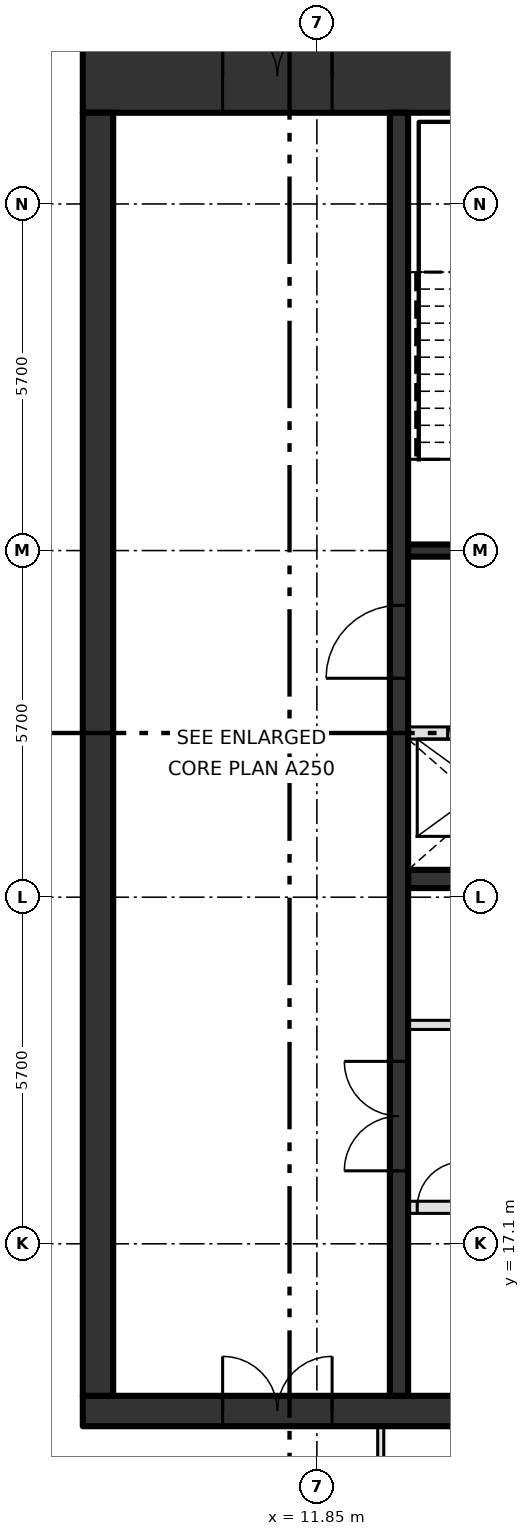
"""IFC4 building model, lengths in metres.
Left out: names, types, materials, properties, quantities, classifications, styles, units other than length and angle.
Written with IfcOpenShell. Run it as: python <this file> out.ifc"""

import sys

from ifc_helpers import new_model, si_unit, direction, frame, frame_2d, origin, place, context, subcontext, project, spatial, rectangle, extrude, element, fill, save


model = new_model("IFC4")
c1 = context("Model", 3, precision=1e-05, world=origin(), true_north=direction((0.0, 1.0)))
c2 = subcontext(c1, "Body", "Model", "MODEL_VIEW")
j1 = project(units=[si_unit("LENGTHUNIT", "METRE"), si_unit("PLANEANGLEUNIT", "RADIAN")], contexts=[c1])
p1 = place(None, origin())
s1 = spatial("IfcSite", under=j1, at=p1, CompositionType="ELEMENT")
p2 = place(p1, origin())
s2 = spatial("IfcBuilding", under=s1, at=p2, CompositionType="ELEMENT")
p3 = place(p2, frame((0.0, 0.0, 383.4)))
s3 = spatial("IfcBuildingStorey", under=s2, at=p3, CompositionType="ELEMENT", Elevation=383.4)
p4 = place(p3, frame((8.0, 14.35, -0.3), z_axis=(0.0, 0.0, 1.0), x_axis=(1.0, 0.0, 0.0)))
e1 = element("IfcWall", 1, at=p4, inside=s3, PredefinedType="SHEAR", context=c2, shape_type="SweptSolid", body=[
    extrude(rectangle(XDim=22.8, YDim=0.5, at=frame_2d((11.4, 0.0))), origin(), (0.0, 0.0, 1.0), 4.2),
])
p5 = place(p4, frame((2.3, 0.0, 0.3)))
e2 = element("IfcOpeningElement", 2, at=p5, cuts=e1, PredefinedType="OPENING", context=c2, shape_type="SweptSolid", body=[
    extrude(rectangle(XDim=1.8, YDim=2.1, at=frame_2d((0.9, 1.05))), frame((0.0, 0.26, 0.0), z_axis=(0.0, -1.0, 0.0), x_axis=(1.0, 0.0, 0.0)), (0.0, 0.0, 1.0), 0.52),
])
p6 = place(p3, frame((8.0, 36.3, -0.3), z_axis=(0.0, 0.0, 1.0), x_axis=(1.0, 0.0, 0.0)))
e3 = element("IfcWall", 3, at=p6, inside=s3, PredefinedType="SHEAR", context=c2, shape_type="SweptSolid", body=[
    extrude(rectangle(XDim=22.8, YDim=1.2, at=frame_2d((11.4, 0.0))), origin(), (0.0, 0.0, 1.0), 4.2),
])
p7 = place(p6, frame((2.3, 0.0, 0.3)))
e4 = element("IfcOpeningElement", 4, at=p7, cuts=e3, PredefinedType="OPENING", context=c2, shape_type="SweptSolid", body=[
    extrude(rectangle(XDim=1.8, YDim=2.1, at=frame_2d((0.9, 1.05))), frame((0.0, 0.61, 0.0), z_axis=(0.0, -1.0, 0.0), x_axis=(1.0, 0.0, 0.0)), (0.0, 0.0, 1.0), 1.22),
])
p8 = place(p3, frame((8.25, 14.6, -0.3), z_axis=(0.0, 0.0, 1.0), x_axis=(0.0, 1.0, 0.0)))
e5 = element("IfcWall", 5, at=p8, inside=s3, PredefinedType="SHEAR", context=c2, shape_type="SweptSolid", body=[
    extrude(rectangle(XDim=21.1, YDim=0.5, at=frame_2d((10.55, 0.0))), origin(), (0.0, 0.0, 1.0), 4.2),
])
p9 = place(p3, frame((13.35, 17.7, 0.0), z_axis=(0.0, 0.0, 1.0), x_axis=(1.0, 0.0, 0.0)))
e6 = element("IfcWall", 6, at=p9, inside=s3, PredefinedType="SOLIDWALL", context=c2, shape_type="SweptSolid", body=[
    extrude(rectangle(XDim=13.425, YDim=0.2, at=frame_2d((6.712, 0.0))), origin(), (0.0, 0.0, 1.0), 3.9),
])
p10 = place(p9, frame((2.0, 0.0, 0.0)))
e7 = element("IfcOpeningElement", 7, at=p10, cuts=e6, PredefinedType="OPENING", context=c2, shape_type="SweptSolid", body=[
    extrude(rectangle(XDim=1.1, YDim=2.1, at=frame_2d((0.55, 1.05))), frame((0.0, 0.11, 0.0), z_axis=(0.0, -1.0, 0.0), x_axis=(1.0, 0.0, 0.0)), (0.0, 0.0, 1.0), 0.22),
])
p11 = place(p9, frame((4.7, 0.0, 0.0)))
e8 = element("IfcOpeningElement", 8, at=p11, cuts=e6, PredefinedType="OPENING", context=c2, shape_type="SweptSolid", body=[
    extrude(rectangle(XDim=1.1, YDim=2.1, at=frame_2d((0.55, 1.05))), frame((0.0, 0.11, 0.0), z_axis=(0.0, -1.0, 0.0), x_axis=(1.0, 0.0, 0.0)), (0.0, 0.0, 1.0), 0.22),
])
p12 = place(p9, frame((7.4, 0.0, 0.0)))
e9 = element("IfcOpeningElement", 9, at=p12, cuts=e6, PredefinedType="OPENING", context=c2, shape_type="SweptSolid", body=[
    extrude(rectangle(XDim=1.1, YDim=2.1, at=frame_2d((0.55, 1.05))), frame((0.0, 0.11, 0.0), z_axis=(0.0, -1.0, 0.0), x_axis=(1.0, 0.0, 0.0)), (0.0, 0.0, 1.0), 0.22),
])
p13 = place(p9, frame((10.1, 0.0, 0.0)))
e10 = element("IfcOpeningElement", 10, at=p13, cuts=e6, PredefinedType="OPENING", context=c2, shape_type="SweptSolid", body=[
    extrude(rectangle(XDim=1.1, YDim=2.1, at=frame_2d((0.55, 1.05))), frame((0.0, 0.11, 0.0), z_axis=(0.0, -1.0, 0.0), x_axis=(1.0, 0.0, 0.0)), (0.0, 0.0, 1.0), 0.22),
])
p14 = place(p9, frame((0.15, 0.0, 0.0)))
e11 = element("IfcOpeningElement", 11, at=p14, cuts=e6, PredefinedType="OPENING", context=c2, shape_type="SweptSolid", body=[
    extrude(rectangle(XDim=0.75, YDim=2.1, at=frame_2d((0.375, 1.05))), frame((0.0, 0.11, 0.0), z_axis=(0.0, -1.0, 0.0), x_axis=(1.0, 0.0, 0.0)), (0.0, 0.0, 1.0), 0.22),
])
p15 = place(p9, frame((12.3, 0.0, 0.0)))
e12 = element("IfcOpeningElement", 12, at=p15, cuts=e6, PredefinedType="OPENING", context=c2, shape_type="SweptSolid", body=[
    extrude(rectangle(XDim=0.75, YDim=2.1, at=frame_2d((0.375, 1.05))), frame((0.0, 0.11, 0.0), z_axis=(0.0, -1.0, 0.0), x_axis=(1.0, 0.0, 0.0)), (0.0, 0.0, 1.0), 0.22),
])
p16 = place(p3, frame((13.35, 20.7, 0.0), z_axis=(0.0, 0.0, 1.0), x_axis=(1.0, 0.0, 0.0)))
e13 = element("IfcWall", 13, at=p16, inside=s3, PredefinedType="PARTITIONING", context=c2, shape_type="SweptSolid", body=[
    extrude(rectangle(XDim=13.425, YDim=0.15, at=frame_2d((6.712, 0.0))), origin(), (0.0, 0.0, 1.0), 3.9),
])
p17 = place(p16, frame((4.8, 0.0, 0.0)))
e14 = element("IfcOpeningElement", 14, at=p17, cuts=e13, PredefinedType="OPENING", context=c2, shape_type="SweptSolid", body=[
    extrude(rectangle(XDim=0.9, YDim=2.1, at=frame_2d((0.45, 1.05))), frame((0.0, 0.085, 0.0), z_axis=(0.0, -1.0, 0.0), x_axis=(1.0, 0.0, 0.0)), (0.0, 0.0, 1.0), 0.17),
])
p18 = place(p16, frame((11.55, 0.0, 0.0)))
e15 = element("IfcOpeningElement", 15, at=p18, cuts=e13, PredefinedType="OPENING", context=c2, shape_type="SweptSolid", body=[
    extrude(rectangle(XDim=0.9, YDim=2.1, at=frame_2d((0.45, 1.05))), frame((0.0, 0.085, 0.0), z_axis=(0.0, -1.0, 0.0), x_axis=(1.0, 0.0, 0.0)), (0.0, 0.0, 1.0), 0.17),
])
p19 = place(p3, frame((13.35, 23.1, 0.0), z_axis=(0.0, 0.0, 1.0), x_axis=(1.0, 0.0, 0.0)))
e16 = element("IfcWall", 16, at=p19, inside=s3, PredefinedType="SHEAR", context=c2, shape_type="SweptSolid", body=[
    extrude(rectangle(XDim=16.95, YDim=0.3, at=frame_2d((8.475, 0.0))), origin(), (0.0, 0.0, 1.0), 3.9),
])
p20 = place(p3, frame((13.35, 25.5, 0.0), z_axis=(0.0, 0.0, 1.0), x_axis=(1.0, 0.0, 0.0)))
e17 = element("IfcWall", 17, at=p20, inside=s3, PredefinedType="SOLIDWALL", context=c2, shape_type="SweptSolid", body=[
    extrude(rectangle(XDim=16.95, YDim=0.2, at=frame_2d((8.475, 0.0))), origin(), (0.0, 0.0, 1.0), 3.9),
])
p21 = place(p20, frame((0.65, 0.0, 0.0)))
e18 = element("IfcOpeningElement", 18, at=p21, cuts=e17, PredefinedType="OPENING", context=c2, shape_type="SweptSolid", body=[
    extrude(rectangle(XDim=1.1, YDim=2.1, at=frame_2d((0.55, 1.05))), frame((0.0, 0.11, 0.0), z_axis=(0.0, -1.0, 0.0), x_axis=(1.0, 0.0, 0.0)), (0.0, 0.0, 1.0), 0.22),
])
p22 = place(p20, frame((3.35, 0.0, 0.0)))
e19 = element("IfcOpeningElement", 19, at=p22, cuts=e17, PredefinedType="OPENING", context=c2, shape_type="SweptSolid", body=[
    extrude(rectangle(XDim=1.1, YDim=2.1, at=frame_2d((0.55, 1.05))), frame((0.0, 0.11, 0.0), z_axis=(0.0, -1.0, 0.0), x_axis=(1.0, 0.0, 0.0)), (0.0, 0.0, 1.0), 0.22),
])
p23 = place(p20, frame((6.05, 0.0, 0.0)))
e20 = element("IfcOpeningElement", 20, at=p23, cuts=e17, PredefinedType="OPENING", context=c2, shape_type="SweptSolid", body=[
    extrude(rectangle(XDim=1.1, YDim=2.1, at=frame_2d((0.55, 1.05))), frame((0.0, 0.11, 0.0), z_axis=(0.0, -1.0, 0.0), x_axis=(1.0, 0.0, 0.0)), (0.0, 0.0, 1.0), 0.22),
])
p24 = place(p20, frame((8.75, 0.0, 0.0)))
e21 = element("IfcOpeningElement", 21, at=p24, cuts=e17, PredefinedType="OPENING", context=c2, shape_type="SweptSolid", body=[
    extrude(rectangle(XDim=1.1, YDim=2.1, at=frame_2d((0.55, 1.05))), frame((0.0, 0.11, 0.0), z_axis=(0.0, -1.0, 0.0), x_axis=(1.0, 0.0, 0.0)), (0.0, 0.0, 1.0), 0.22),
])
p25 = place(p20, frame((13.0, 0.0, 0.0)))
e22 = element("IfcOpeningElement", 22, at=p25, cuts=e17, PredefinedType="OPENING", context=c2, shape_type="SweptSolid", body=[
    extrude(rectangle(XDim=0.9, YDim=2.1, at=frame_2d((0.45, 1.05))), frame((0.0, 0.11, 0.0), z_axis=(0.0, -1.0, 0.0), x_axis=(1.0, 0.0, 0.0)), (0.0, 0.0, 1.0), 0.22),
])
p26 = place(p3, frame((13.35, 28.5, 0.0), z_axis=(0.0, 0.0, 1.0), x_axis=(1.0, 0.0, 0.0)))
e23 = element("IfcWall", 23, at=p26, inside=s3, PredefinedType="SOLIDWALL", context=c2, shape_type="SweptSolid", body=[
    extrude(rectangle(XDim=6.75, YDim=0.2, at=frame_2d((3.375, 0.0))), origin(), (0.0, 0.0, 1.0), 3.9),
])
p27 = place(p26, frame((0.95, 0.0, 0.0)))
e24 = element("IfcOpeningElement", 24, at=p27, cuts=e23, PredefinedType="OPENING", context=c2, shape_type="SweptSolid", body=[
    extrude(rectangle(XDim=1.2, YDim=2.1, at=frame_2d((0.6, 1.05))), frame((0.0, 0.11, 0.0), z_axis=(0.0, -1.0, 0.0), x_axis=(1.0, 0.0, 0.0)), (0.0, 0.0, 1.0), 0.22),
])
p28 = place(p26, frame((3.75, 0.0, 0.0)))
e25 = element("IfcOpeningElement", 25, at=p28, cuts=e23, PredefinedType="OPENING", context=c2, shape_type="SweptSolid", body=[
    extrude(rectangle(XDim=1.1, YDim=2.1, at=frame_2d((0.55, 1.05))), frame((0.0, 0.11, 0.0), z_axis=(0.0, -1.0, 0.0), x_axis=(1.0, 0.0, 0.0)), (0.0, 0.0, 1.0), 0.22),
])
p29 = place(p3, frame((13.2, 14.6, 0.0), z_axis=(0.0, 0.0, 1.0), x_axis=(0.0, 1.0, 0.0)))
e26 = element("IfcWall", 26, at=p29, inside=s3, PredefinedType="SHEAR", context=c2, shape_type="SweptSolid", body=[
    extrude(rectangle(XDim=21.1, YDim=0.3, at=frame_2d((10.55, 0.0))), origin(), (0.0, 0.0, 1.0), 3.9),
])
p30 = place(p29, frame((3.7, 0.0, 0.0)))
e27 = element("IfcOpeningElement", 27, at=p30, cuts=e26, PredefinedType="OPENING", context=c2, shape_type="SweptSolid", body=[
    extrude(rectangle(XDim=1.8, YDim=2.1, at=frame_2d((0.9, 1.05))), frame((0.0, 0.16, 0.0), z_axis=(0.0, -1.0, 0.0), x_axis=(1.0, 0.0, 0.0)), (0.0, 0.0, 1.0), 0.32),
])
p31 = place(p29, frame((11.8, 0.0, 0.0)))
e28 = element("IfcOpeningElement", 28, at=p31, cuts=e26, PredefinedType="OPENING", context=c2, shape_type="SweptSolid", body=[
    extrude(rectangle(XDim=1.2, YDim=2.1, at=frame_2d((0.6, 1.05))), frame((0.0, 0.16, 0.0), z_axis=(0.0, -1.0, 0.0), x_axis=(1.0, 0.0, 0.0)), (0.0, 0.0, 1.0), 0.32),
])
p32 = place(p3, frame((12.9, 10.078, 0.0), z_axis=(0.0, 0.0, 1.0), x_axis=(0.0, 1.0, 0.0)))
e29 = element("IfcWall", 29, at=p32, inside=s3, PredefinedType="PARTITIONING", context=c2, shape_type="SweptSolid", body=[
    extrude(rectangle(XDim=4.022, YDim=0.1, at=frame_2d((2.011, 0.0))), origin(), (0.0, 0.0, 1.0), 3.9),
])
p33 = place(p3, frame((13.183, 9.578, 0.0), z_axis=(0.0, 0.0, 1.0), x_axis=(0.374400970809, 0.927266904973, 0.0)))
e30 = element("IfcWall", 30, at=p33, inside=s3, PredefinedType="PARTITIONING", context=c2, shape_type="SweptSolid", body=[
    extrude(rectangle(XDim=4.877, YDim=0.1, at=frame_2d((2.438, 0.0))), origin(), (0.0, 0.0, 1.0), 3.9),
])
p34 = place(p21, origin())
e31 = element("IfcDoor", 31, at=p34, inside=s3, OperationType="SLIDING_TO_LEFT", PredefinedType="DOOR", context=c2, shape_type="SweptSolid", body=[
    extrude(rectangle(XDim=1.1, YDim=2.1, at=frame_2d((0.55, 1.05))), frame((0.0, 0.025, 0.0), z_axis=(0.0, -1.0, 0.0), x_axis=(1.0, 0.0, 0.0)), (0.0, 0.0, 1.0), 0.05),
])
fill(e18, e31)
p35 = place(p14, origin())
e32 = element("IfcDoor", 32, at=p35, inside=s3, OperationType="SINGLE_SWING_RIGHT", PredefinedType="DOOR", context=c2, shape_type="SweptSolid", body=[
    extrude(rectangle(XDim=0.75, YDim=2.1, at=frame_2d((0.375, 1.05))), frame((0.0, 0.025, 0.0), z_axis=(0.0, -1.0, 0.0), x_axis=(1.0, 0.0, 0.0)), (0.0, 0.0, 1.0), 0.05),
])
fill(e11, e32)
p36 = place(p30, origin())
e33 = element("IfcDoor", 33, at=p36, inside=s3, OperationType="DOUBLE_DOOR_SINGLE_SWING", PredefinedType="DOOR", context=c2, shape_type="SweptSolid", body=[
    extrude(rectangle(XDim=1.8, YDim=2.1, at=frame_2d((0.9, 1.05))), frame((0.0, 0.025, 0.0), z_axis=(0.0, -1.0, 0.0), x_axis=(1.0, 0.0, 0.0)), (0.0, 0.0, 1.0), 0.05),
])
fill(e27, e33)
p37 = place(p31, origin())
e34 = element("IfcDoor", 34, at=p37, inside=s3, OperationType="SINGLE_SWING_LEFT", PredefinedType="DOOR", context=c2, shape_type="SweptSolid", body=[
    extrude(rectangle(XDim=1.2, YDim=2.1, at=frame_2d((0.6, 1.05))), frame((0.0, 0.025, 0.0), z_axis=(0.0, -1.0, 0.0), x_axis=(1.0, 0.0, 0.0)), (0.0, 0.0, 1.0), 0.05),
])
fill(e28, e34)
p38 = place(p7, origin())
e35 = element("IfcDoor", 35, at=p38, inside=s3, OperationType="DOUBLE_DOOR_SINGLE_SWING", PredefinedType="DOOR", context=c2, shape_type="SweptSolid", body=[
    extrude(rectangle(XDim=1.8, YDim=2.1, at=frame_2d((0.9, 1.05))), frame((0.0, 0.025, 0.0), z_axis=(0.0, -1.0, 0.0), x_axis=(1.0, 0.0, 0.0)), (0.0, 0.0, 1.0), 0.05),
])
fill(e4, e35)
p39 = place(p5, origin())
e36 = element("IfcDoor", 36, at=p39, inside=s3, OperationType="DOUBLE_DOOR_SINGLE_SWING", PredefinedType="DOOR", context=c2, shape_type="SweptSolid", body=[
    extrude(rectangle(XDim=1.8, YDim=2.1, at=frame_2d((0.9, 1.05))), frame((0.0, 0.025, 0.0), z_axis=(0.0, -1.0, 0.0), x_axis=(1.0, 0.0, 0.0)), (0.0, 0.0, 1.0), 0.05),
])
fill(e2, e36)
save(model, sys.argv[1])
